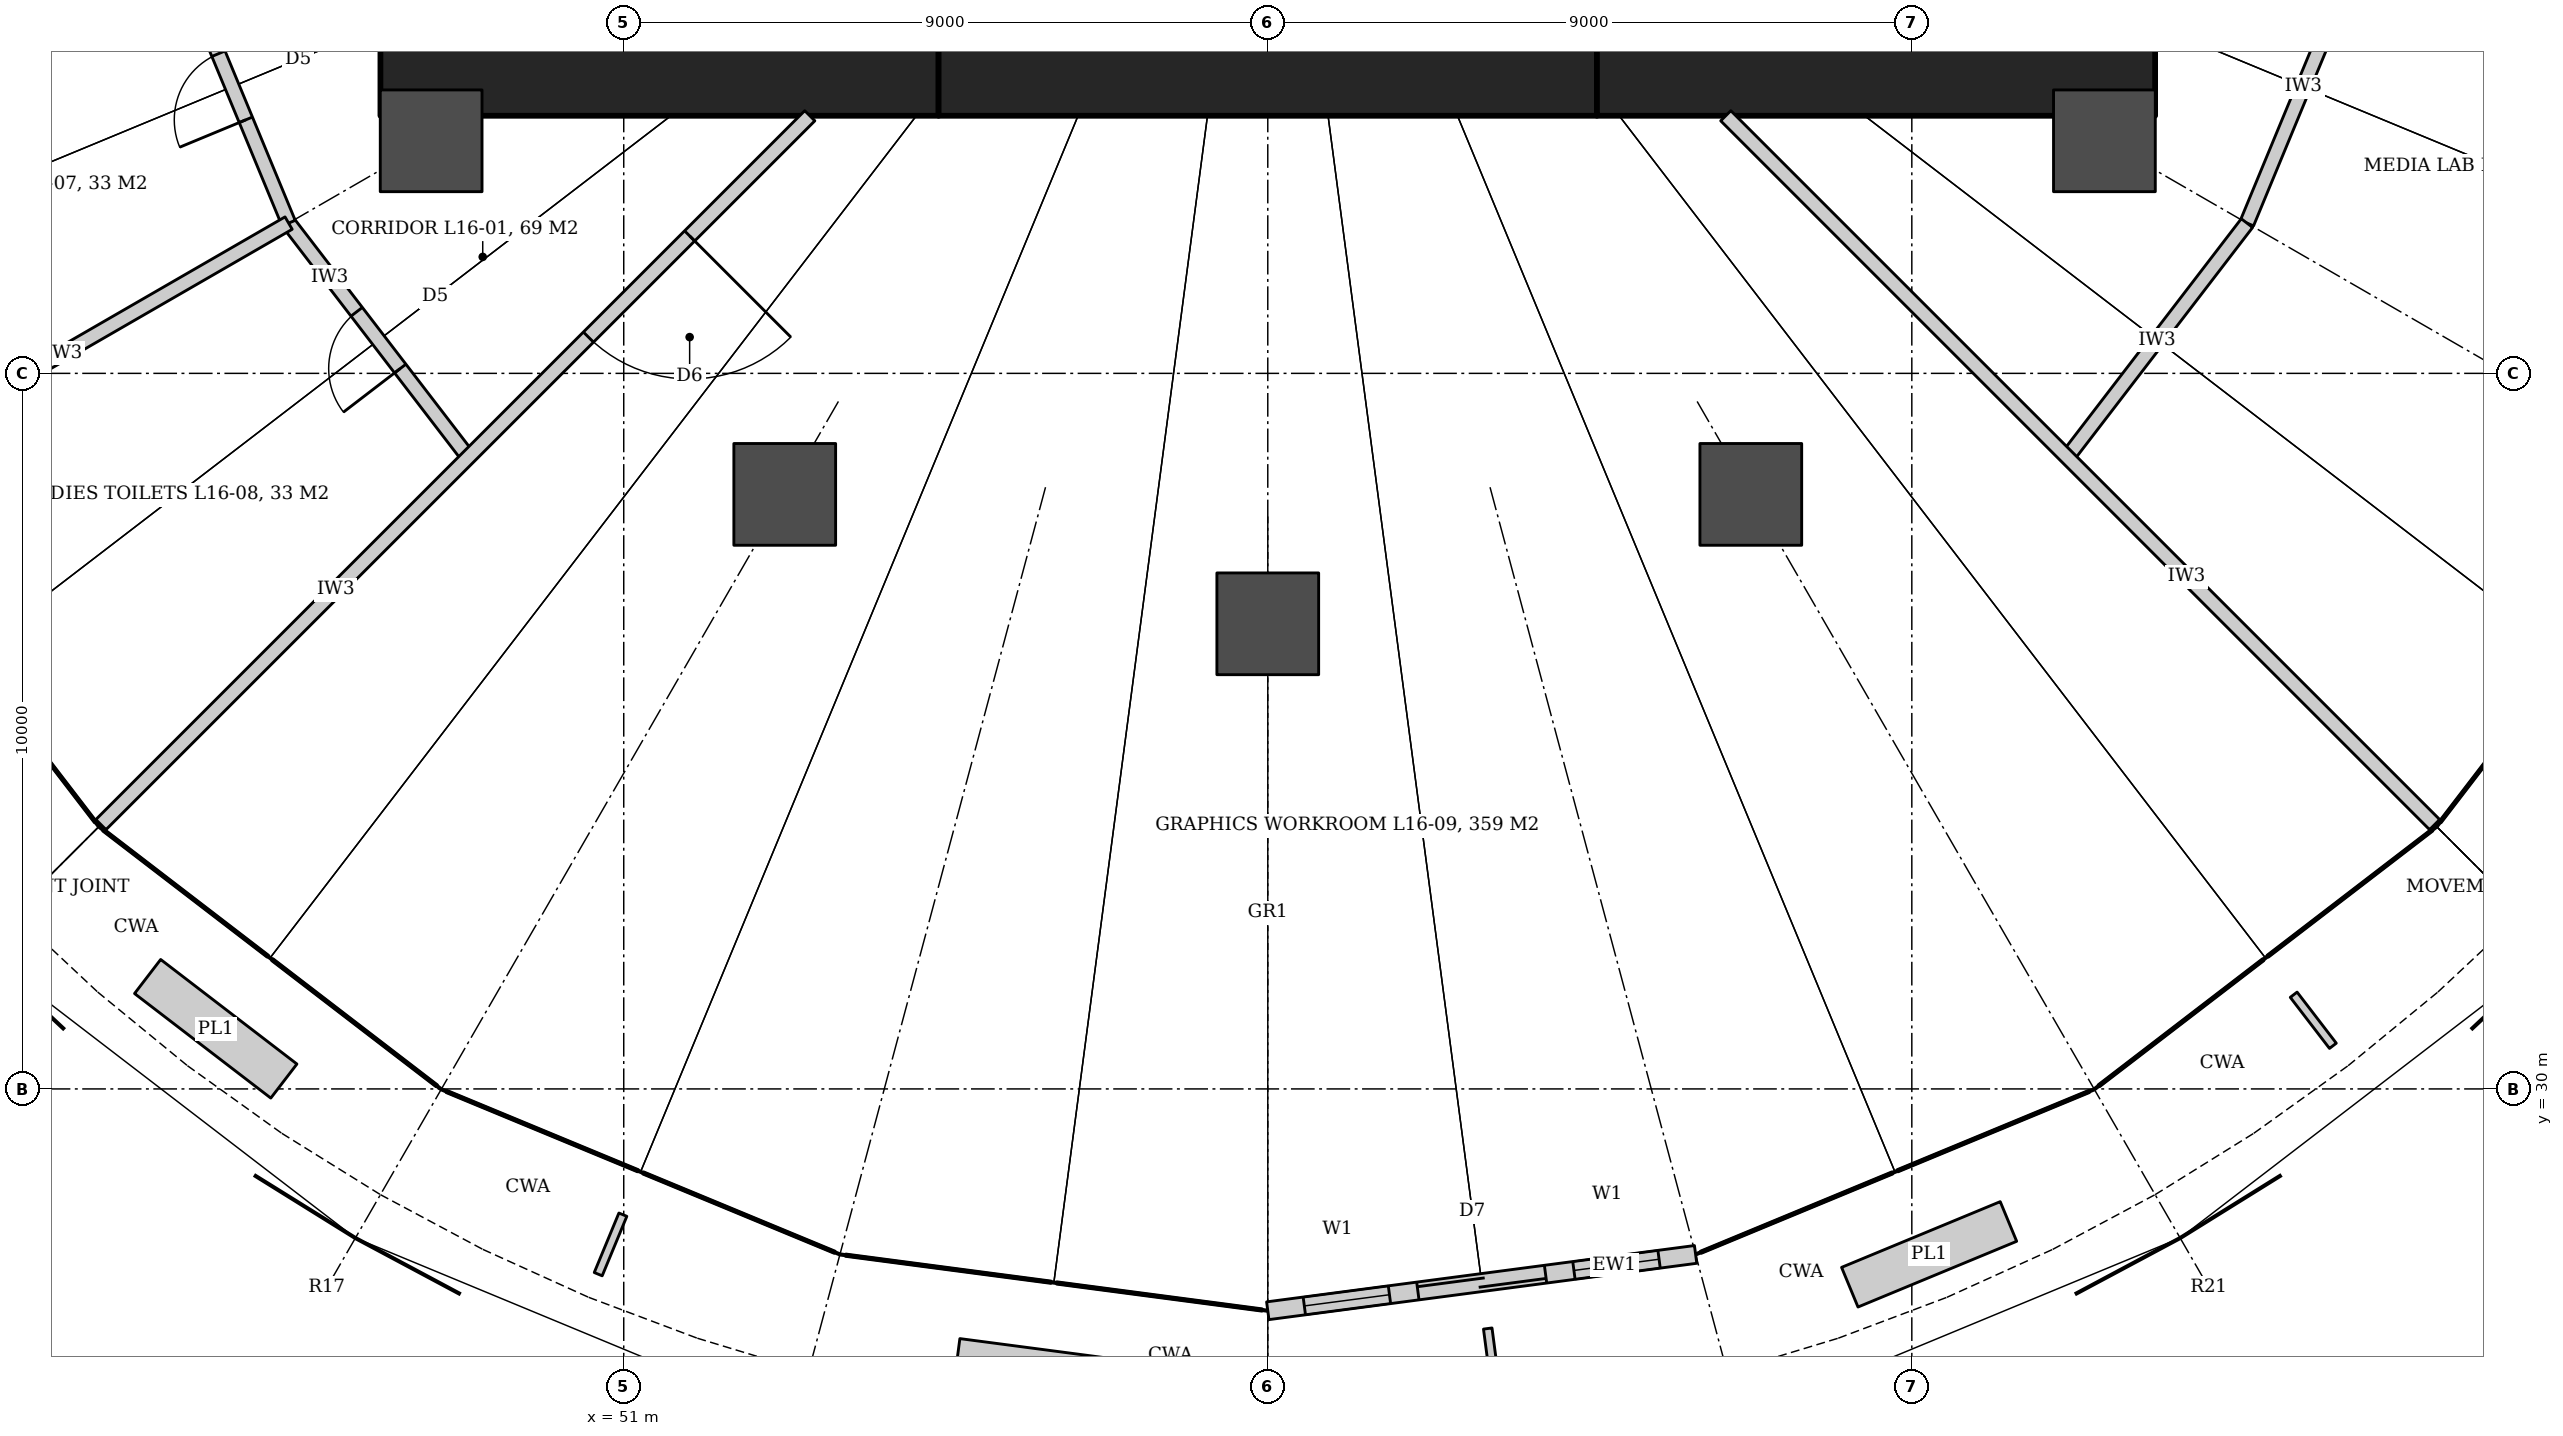
"""IFC4 building model, lengths in metres.
Left out: names, types, materials, properties, quantities, classifications, styles, units other than length and angle.
Written with IfcOpenShell. Run it as: python <this file> out.ifc"""

import sys

from ifc_helpers import new_model, si_unit, direction, frame, frame_2d, origin, origin_2d, place, context, subcontext, project, spatial, rectangle, hollow_circle, extrude, element, fill, save


model = new_model("IFC4")
c1 = context("Model", 3, precision=1e-05, world=origin(), true_north=direction((0.0, 1.0)))
c2 = subcontext(c1, "Body", "Model", "MODEL_VIEW")
j1 = project(units=[si_unit("LENGTHUNIT", "METRE"), si_unit("PLANEANGLEUNIT", "RADIAN")], contexts=[c1])
p1 = place(None, origin())
s1 = spatial("IfcSite", under=j1, at=p1, CompositionType="ELEMENT")
p2 = place(p1, origin())
s2 = spatial("IfcBuilding", under=s1, at=p2, CompositionType="ELEMENT")
p3 = place(p2, frame((0.0, 0.0, 68.0)))
s3 = spatial("IfcBuildingStorey", under=s2, at=p3, CompositionType="ELEMENT", Elevation=68.0)
p4 = place(p3, frame((47.6, 44.5, 0.0), z_axis=(0.0, 0.0, 1.0), x_axis=(1.0, 0.0, 0.0)))
e1 = element("IfcWall", 1, at=p4, inside=s3, PredefinedType="SHEAR", context=c2, shape_type="SweptSolid", body=[
    extrude(rectangle(XDim=7.8, YDim=1.8, at=frame_2d((3.9, 0.0))), origin(), (0.0, 0.0, 1.0), 4.2),
])
p5 = place(p3, frame((55.4, 44.5, 0.0), z_axis=(0.0, 0.0, 1.0), x_axis=(1.0, 0.0, 0.0)))
e2 = element("IfcWall", 2, at=p5, inside=s3, PredefinedType="SHEAR", context=c2, shape_type="SweptSolid", body=[
    extrude(rectangle(XDim=9.2, YDim=1.8, at=frame_2d((4.6, 0.0))), origin(), (0.0, 0.0, 1.0), 4.2),
])
p6 = place(p3, frame((64.6, 44.5, 0.0), z_axis=(0.0, 0.0, 1.0), x_axis=(1.0, 0.0, 0.0)))
e3 = element("IfcWall", 3, at=p6, inside=s3, PredefinedType="SHEAR", context=c2, shape_type="SweptSolid", body=[
    extrude(rectangle(XDim=7.8, YDim=1.8, at=frame_2d((3.9, 0.0))), origin(), (0.0, 0.0, 1.0), 4.2),
])
for number, where, z_axis, x_axis in (
    (4, (48.309, 43.25, 0.0), (0.0, 0.0, 1.0), (1.0, 0.0, 0.0)),
    (5, (53.25, 38.309, 0.0), (0.0, 0.0, 1.0), (1.0, 0.0, 0.0)),
    (6, (60.0, 36.5, 0.0), (0.0, 0.0, 1.0), (1.0, 0.0, 0.0)),
    (7, (66.75, 38.309, 0.0), (0.0, 0.0, 1.0), (1.0, 0.0, 0.0)),
    (8, (71.691, 43.25, 0.0), (0.0, 0.0, 1.0), (1.0, 0.0, 0.0)),
):
    element("IfcColumn", number, at=place(p3, frame(where, z_axis=z_axis, x_axis=x_axis)), inside=s3, PredefinedType="COLUMN", context=c2, shape_type="SweptSolid", body=[
        extrude(hollow_circle(Radius=0.711, WallThickness=0.07, at=origin_2d()), origin(), (0.0, 0.0, 1.0), 4.2),
    ])
p7 = place(p3, frame((48.828, 38.828, 0.0), z_axis=(0.0, 0.0, 1.0), x_axis=(-0.608714823874, 0.793389099494, 0.0)))
e9 = element("IfcWall", 9, at=p7, inside=s3, PredefinedType="PARTITIONING", context=c2, shape_type="SweptSolid", body=[
    extrude(rectangle(XDim=4.125, YDim=0.2, at=frame_2d((2.062, 0.0))), origin(), (0.0, 0.0, 1.0), 3.04),
])
p8 = place(p7, frame((1.562, 0.0, 0.0)))
e10 = element("IfcOpeningElement", 10, at=p8, cuts=e9, PredefinedType="OPENING", context=c2, shape_type="SweptSolid", body=[
    extrude(rectangle(XDim=1.0, YDim=2.1, at=frame_2d((0.5, 1.05))), frame((0.0, 0.11, 0.0), z_axis=(0.0, -1.0, 0.0), x_axis=(1.0, 0.0, 0.0)), (0.0, 0.0, 1.0), 0.22),
])
p9 = place(p3, frame((46.317, 42.1, 0.0), z_axis=(0.0, 0.0, 1.0), x_axis=(-0.382731667114, 0.923859551549, 0.0)))
e11 = element("IfcWall", 11, at=p9, inside=s3, PredefinedType="PARTITIONING", context=c2, shape_type="SweptSolid", body=[
    extrude(rectangle(XDim=4.125, YDim=0.2, at=frame_2d((2.062, 0.0))), origin(), (0.0, 0.0, 1.0), 3.04),
])
p10 = place(p9, frame((1.562, 0.0, 0.0)))
e12 = element("IfcOpeningElement", 12, at=p10, cuts=e11, PredefinedType="OPENING", context=c2, shape_type="SweptSolid", body=[
    extrude(rectangle(XDim=1.0, YDim=2.1, at=frame_2d((0.5, 1.05))), frame((0.0, 0.11, 0.0), z_axis=(0.0, -1.0, 0.0), x_axis=(1.0, 0.0, 0.0)), (0.0, 0.0, 1.0), 0.22),
])
p11 = place(p3, frame((75.262, 45.911, 0.0), z_axis=(0.0, 0.0, 1.0), x_axis=(-0.382731667114, -0.923859551549, 0.0)))
e13 = element("IfcWall", 13, at=p11, inside=s3, PredefinedType="PARTITIONING", context=c2, shape_type="SweptSolid", body=[
    extrude(rectangle(XDim=4.125, YDim=0.2, at=frame_2d((2.062, 0.0))), origin(), (0.0, 0.0, 1.0), 3.04),
])
p12 = place(p3, frame((73.683, 42.1, 0.0), z_axis=(0.0, 0.0, 1.0), x_axis=(-0.608714823874, -0.793389099494, 0.0)))
e14 = element("IfcWall", 14, at=p12, inside=s3, PredefinedType="PARTITIONING", context=c2, shape_type="SweptSolid", body=[
    extrude(rectangle(XDim=4.125, YDim=0.2, at=frame_2d((2.062, 0.0))), origin(), (0.0, 0.0, 1.0), 3.04),
])
p13 = place(p3, frame((44.738, 45.911, 0.0), z_axis=(0.0, 0.0, 1.0), x_axis=(-0.965928911257, -0.258807531571, 0.0)))
e15 = element("IfcWall", 15, at=p13, inside=s3, PredefinedType="PARTITIONING", context=c2, shape_type="SweptSolid", body=[
    extrude(rectangle(XDim=7.06, YDim=0.2, at=frame_2d((3.53, 0.0))), origin(), (0.0, 0.0, 1.0), 3.04),
])
p14 = place(p3, frame((46.317, 42.1, 0.0), z_axis=(0.0, 0.0, 1.0), x_axis=(-0.866018643436, -0.500011709085, 0.0)))
e16 = element("IfcWall", 16, at=p14, inside=s3, PredefinedType="PARTITIONING", context=c2, shape_type="SweptSolid", body=[
    extrude(rectangle(XDim=7.16, YDim=0.2, at=frame_2d((3.58, 0.0))), origin(), (0.0, 0.0, 1.0), 3.04),
])
p15 = place(p3, frame((53.6, 43.6, 0.0), z_axis=(0.0, 0.0, 1.0), x_axis=(-0.707106781187, -0.707106781187, 0.0)))
e17 = element("IfcWall", 17, at=p15, inside=s3, PredefinedType="PARTITIONING", context=c2, shape_type="SweptSolid", body=[
    extrude(rectangle(XDim=13.909, YDim=0.2, at=frame_2d((6.955, 0.0))), origin(), (0.0, 0.0, 1.0), 3.02),
])
p16 = place(p15, frame((2.375, 0.0, 0.0)))
e18 = element("IfcOpeningElement", 18, at=p16, cuts=e17, PredefinedType="OPENING", context=c2, shape_type="SweptSolid", body=[
    extrude(rectangle(XDim=2.0, YDim=2.1, at=frame_2d((1.0, 1.05))), frame((0.0, 0.11, 0.0), z_axis=(0.0, -1.0, 0.0), x_axis=(1.0, 0.0, 0.0)), (0.0, 0.0, 1.0), 0.22),
])
p17 = place(p3, frame((66.4, 43.6, 0.0), z_axis=(0.0, 0.0, 1.0), x_axis=(0.707106781187, -0.707106781187, 0.0)))
e19 = element("IfcWall", 19, at=p17, inside=s3, PredefinedType="PARTITIONING", context=c2, shape_type="SweptSolid", body=[
    extrude(rectangle(XDim=13.909, YDim=0.2, at=frame_2d((6.955, 0.0))), origin(), (0.0, 0.0, 1.0), 3.02),
])
p18 = place(p3, frame((60.0, 27.0, 0.0), z_axis=(0.0, 0.0, 1.0), x_axis=(0.991445297315, 0.130522880875, 0.0)))
e20 = element("IfcWall", 20, at=p18, inside=s3, PredefinedType="SOLIDWALL", context=c2, shape_type="SweptSolid", body=[
    extrude(rectangle(XDim=6.004, YDim=0.25, at=frame_2d((3.002, 0.0))), origin(), (0.0, 0.0, 1.0), 4.04),
])
p19 = place(p18, frame((2.102, 0.0, 0.0)))
e21 = element("IfcOpeningElement", 21, at=p19, cuts=e20, PredefinedType="OPENING", context=c2, shape_type="SweptSolid", body=[
    extrude(rectangle(XDim=1.8, YDim=2.4, at=frame_2d((0.9, 1.2))), frame((0.0, 0.135, 0.0), z_axis=(0.0, -1.0, 0.0), x_axis=(1.0, 0.0, 0.0)), (0.0, 0.0, 1.0), 0.27),
])
p20 = place(p18, frame((0.502, 0.0, 0.0)))
e22 = element("IfcOpeningElement", 22, at=p20, cuts=e20, PredefinedType="OPENING", context=c2, shape_type="SweptSolid", body=[
    extrude(rectangle(XDim=1.2, YDim=2.4, at=frame_2d((0.6, 1.2))), frame((0.0, 0.135, 0.0), z_axis=(0.0, -1.0, 0.0), x_axis=(1.0, 0.0, 0.0)), (0.0, 0.0, 1.0), 0.27),
])
p21 = place(p18, frame((4.302, 0.0, 0.0)))
e23 = element("IfcOpeningElement", 23, at=p21, cuts=e20, PredefinedType="OPENING", context=c2, shape_type="SweptSolid", body=[
    extrude(rectangle(XDim=1.2, YDim=2.4, at=frame_2d((0.6, 1.2))), frame((0.0, 0.135, 0.0), z_axis=(0.0, -1.0, 0.0), x_axis=(1.0, 0.0, 0.0)), (0.0, 0.0, 1.0), 0.27),
])
p22 = place(p10, origin())
e24 = element("IfcDoor", 24, at=p22, inside=s3, OperationType="SINGLE_SWING_LEFT", PredefinedType="DOOR", context=c2, shape_type="SweptSolid", body=[
    extrude(rectangle(XDim=1.0, YDim=2.1, at=frame_2d((0.5, 1.05))), frame((0.0, 0.025, 0.0), z_axis=(0.0, -1.0, 0.0), x_axis=(1.0, 0.0, 0.0)), (0.0, 0.0, 1.0), 0.05),
])
fill(e12, e24)
p23 = place(p8, origin())
e25 = element("IfcDoor", 25, at=p23, inside=s3, OperationType="SINGLE_SWING_LEFT", PredefinedType="DOOR", context=c2, shape_type="SweptSolid", body=[
    extrude(rectangle(XDim=1.0, YDim=2.1, at=frame_2d((0.5, 1.05))), frame((0.0, 0.025, 0.0), z_axis=(0.0, -1.0, 0.0), x_axis=(1.0, 0.0, 0.0)), (0.0, 0.0, 1.0), 0.05),
])
fill(e10, e25)
p24 = place(p16, origin())
e26 = element("IfcDoor", 26, at=p24, inside=s3, OperationType="DOUBLE_DOOR_DOUBLE_SWING", PredefinedType="DOOR", context=c2, shape_type="SweptSolid", body=[
    extrude(rectangle(XDim=2.0, YDim=2.1, at=frame_2d((1.0, 1.05))), frame((0.0, 0.025, 0.0), z_axis=(0.0, -1.0, 0.0), x_axis=(1.0, 0.0, 0.0)), (0.0, 0.0, 1.0), 0.05),
])
fill(e18, e26)
p25 = place(p19, origin())
e27 = element("IfcDoor", 27, at=p25, inside=s3, OperationType="DOUBLE_DOOR_SLIDING", PredefinedType="DOOR", context=c2, shape_type="SweptSolid", body=[
    extrude(rectangle(XDim=1.8, YDim=2.4, at=frame_2d((0.9, 1.2))), frame((0.0, 0.025, 0.0), z_axis=(0.0, -1.0, 0.0), x_axis=(1.0, 0.0, 0.0)), (0.0, 0.0, 1.0), 0.05),
])
fill(e21, e27)
p26 = place(p20, origin())
e28 = element("IfcWindow", 28, at=p26, inside=s3, PartitioningType="SINGLE_PANEL", PredefinedType="WINDOW", context=c2, shape_type="SweptSolid", body=[
    extrude(rectangle(XDim=1.2, YDim=2.4, at=frame_2d((0.6, 1.2))), frame((0.0, 0.03, 0.0), z_axis=(0.0, -1.0, 0.0), x_axis=(1.0, 0.0, 0.0)), (0.0, 0.0, 1.0), 0.06),
])
fill(e22, e28)
p27 = place(p21, origin())
e29 = element("IfcWindow", 29, at=p27, inside=s3, PartitioningType="SINGLE_PANEL", PredefinedType="WINDOW", context=c2, shape_type="SweptSolid", body=[
    extrude(rectangle(XDim=1.2, YDim=2.4, at=frame_2d((0.6, 1.2))), frame((0.0, 0.03, 0.0), z_axis=(0.0, -1.0, 0.0), x_axis=(1.0, 0.0, 0.0)), (0.0, 0.0, 1.0), 0.06),
])
fill(e23, e29)
save(model, sys.argv[1])
